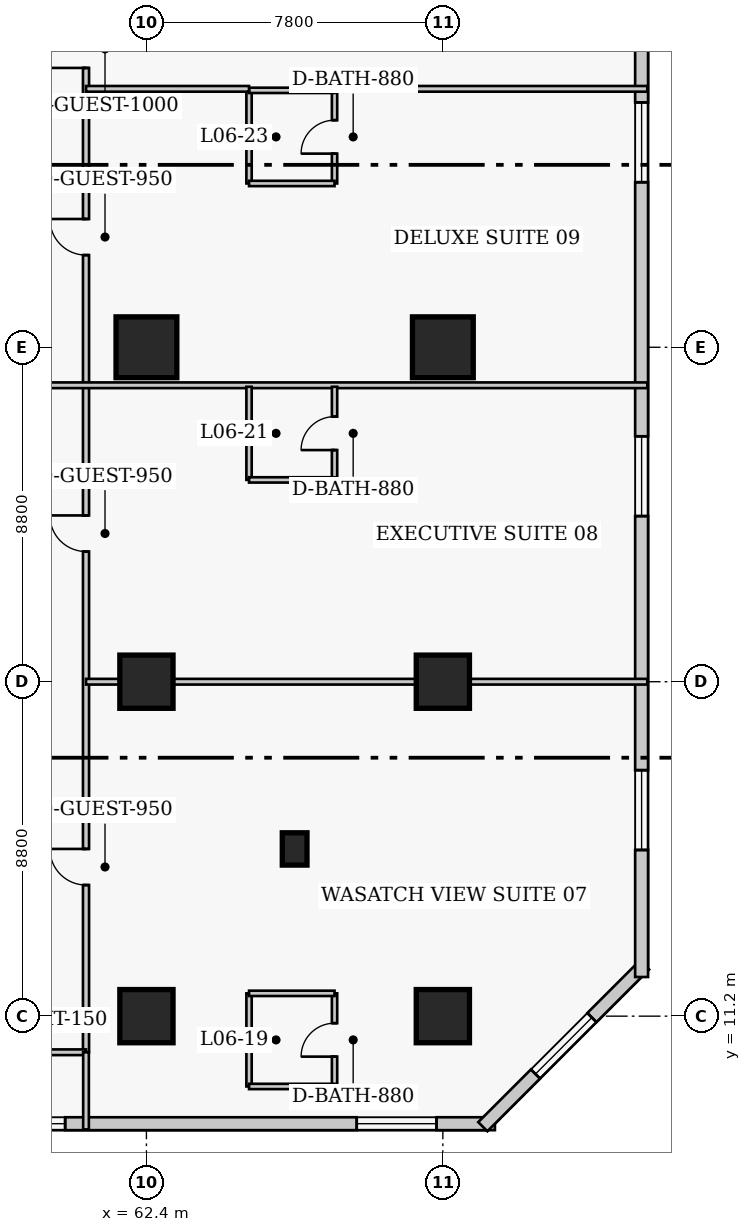
"""IFC4 building model, lengths in metres.
Left out: names, types, materials, properties, quantities, classifications, styles, units other than length and angle.
Written with IfcOpenShell. Run it as: python <this file> out.ifc"""

import sys

from ifc_helpers import new_model, si_unit, direction, frame, frame_2d, origin, origin_2d, place, context, subcontext, project, spatial, rectangle, extrude, element, fill, save


model = new_model("IFC4")
c1 = context("Model", 3, precision=1e-05, world=origin(), true_north=direction((0.0, 1.0)))
c2 = subcontext(c1, "Body", "Model", "MODEL_VIEW")
j1 = project(units=[si_unit("LENGTHUNIT", "METRE"), si_unit("PLANEANGLEUNIT", "RADIAN")], contexts=[c1])
p1 = place(None, origin())
s1 = spatial("IfcSite", under=j1, at=p1, CompositionType="ELEMENT")
p2 = place(p1, origin())
s2 = spatial("IfcBuilding", under=s1, at=p2, CompositionType="ELEMENT")
p3 = place(p2, frame((0.0, 0.0, 29.8)))
s3 = spatial("IfcBuildingStorey", under=s2, at=p3, CompositionType="ELEMENT", Elevation=29.8)
for number, where, z_axis, x_axis in (
    (1, (62.4, 11.2, 0.0), (0.0, 0.0, 1.0), (1.0, 0.0, 0.0)),
    (2, (62.4, 20.0, 0.0), (0.0, 0.0, 1.0), (1.0, 0.0, 0.0)),
):
    element("IfcColumn", number, at=place(p3, frame(where, z_axis=z_axis, x_axis=x_axis)), inside=s3, PredefinedType="COLUMN", context=c2, shape_type="SweptSolid", body=[
        extrude(rectangle(XDim=1.4, YDim=1.4, at=origin_2d()), origin(), (0.0, 0.0, 1.0), 3.8),
    ])
p4 = place(p3, frame((62.4, 28.8, 0.0), z_axis=(0.0, 0.0, 1.0), x_axis=(1.0, 0.0, 0.0)))
e3 = element("IfcColumn", 3, at=p4, inside=s3, PredefinedType="COLUMN", context=c2, shape_type="SweptSolid", body=[
    extrude(rectangle(XDim=1.6, YDim=1.6, at=origin_2d()), origin(), (0.0, 0.0, 1.0), 3.8),
])
for number, where, z_axis, x_axis in (
    (4, (70.2, 11.2, 0.0), (0.0, 0.0, 1.0), (1.0, 0.0, 0.0)),
    (5, (70.2, 20.0, 0.0), (0.0, 0.0, 1.0), (1.0, 0.0, 0.0)),
):
    element("IfcColumn", number, at=place(p3, frame(where, z_axis=z_axis, x_axis=x_axis)), inside=s3, PredefinedType="COLUMN", context=c2, shape_type="SweptSolid", body=[
        extrude(rectangle(XDim=1.4, YDim=1.4, at=origin_2d()), origin(), (0.0, 0.0, 1.0), 3.8),
    ])
p5 = place(p3, frame((70.2, 28.8, 0.0), z_axis=(0.0, 0.0, 1.0), x_axis=(1.0, 0.0, 0.0)))
e6 = element("IfcColumn", 6, at=p5, inside=s3, PredefinedType="COLUMN", context=c2, shape_type="SweptSolid", body=[
    extrude(rectangle(XDim=1.6, YDim=1.6, at=origin_2d()), origin(), (0.0, 0.0, 1.0), 3.8),
])
p6 = place(p3, frame((66.3, 15.6, 0.0), z_axis=(0.0, 0.0, 1.0), x_axis=(1.0, 0.0, 0.0)))
e7 = element("IfcColumn", 7, at=p6, inside=s3, PredefinedType="PILASTER", context=c2, shape_type="SweptSolid", body=[
    extrude(rectangle(XDim=0.65, YDim=0.85, at=origin_2d()), origin(), (0.0, 0.0, 1.0), 3.8),
])
p7 = place(p3, frame((41.68, 8.37, 0.0), z_axis=(0.0, 0.0, 1.0), x_axis=(1.0, 0.0, 0.0)))
e8 = element("IfcWall", 8, at=p7, inside=s3, PredefinedType="SOLIDWALL", context=c2, shape_type="SweptSolid", body=[
    extrude(rectangle(XDim=29.89, YDim=0.34, at=frame_2d((14.945, 0.0))), origin(), (0.0, 0.0, 1.0), 3.54),
])
p8 = place(p7, frame((2.036, 0.0, 0.85)))
e9 = element("IfcOpeningElement", 9, at=p8, cuts=e8, PredefinedType="OPENING", context=c2, shape_type="SweptSolid", body=[
    extrude(rectangle(XDim=2.1, YDim=1.85, at=frame_2d((1.05, 0.925))), frame((0.0, 0.18, 0.0), z_axis=(0.0, -1.0, 0.0), x_axis=(1.0, 0.0, 0.0)), (0.0, 0.0, 1.0), 0.36),
])
p9 = place(p7, frame((9.509, 0.0, 0.85)))
e10 = element("IfcOpeningElement", 10, at=p9, cuts=e8, PredefinedType="OPENING", context=c2, shape_type="SweptSolid", body=[
    extrude(rectangle(XDim=2.1, YDim=1.85, at=frame_2d((1.05, 0.925))), frame((0.0, 0.18, 0.0), z_axis=(0.0, -1.0, 0.0), x_axis=(1.0, 0.0, 0.0)), (0.0, 0.0, 1.0), 0.36),
])
p10 = place(p7, frame((16.481, 0.0, 0.85)))
e11 = element("IfcOpeningElement", 11, at=p10, cuts=e8, PredefinedType="OPENING", context=c2, shape_type="SweptSolid", body=[
    extrude(rectangle(XDim=2.1, YDim=1.85, at=frame_2d((1.05, 0.925))), frame((0.0, 0.18, 0.0), z_axis=(0.0, -1.0, 0.0), x_axis=(1.0, 0.0, 0.0)), (0.0, 0.0, 1.0), 0.36),
])
p11 = place(p7, frame((26.254, 0.0, 0.85)))
e12 = element("IfcOpeningElement", 12, at=p11, cuts=e8, PredefinedType="OPENING", context=c2, shape_type="SweptSolid", body=[
    extrude(rectangle(XDim=2.1, YDim=1.85, at=frame_2d((1.05, 0.925))), frame((0.0, 0.18, 0.0), z_axis=(0.0, -1.0, 0.0), x_axis=(1.0, 0.0, 0.0)), (0.0, 0.0, 1.0), 0.36),
])
p12 = place(p3, frame((71.251, 8.292, 0.0), z_axis=(0.0, 0.0, 1.0), x_axis=(0.707106781187, 0.707106781187, 0.0)))
e13 = element("IfcWall", 13, at=p12, inside=s3, PredefinedType="SOLIDWALL", context=c2, shape_type="SweptSolid", body=[
    extrude(rectangle(XDim=6.02, YDim=0.34, at=frame_2d((3.01, 0.0))), origin(), (0.0, 0.0, 1.0), 3.54),
])
p13 = place(p12, frame((1.96, 0.0, 0.85)))
e14 = element("IfcOpeningElement", 14, at=p13, cuts=e13, PredefinedType="OPENING", context=c2, shape_type="SweptSolid", body=[
    extrude(rectangle(XDim=2.1, YDim=1.85, at=frame_2d((1.05, 0.925))), frame((0.0, 0.18, 0.0), z_axis=(0.0, -1.0, 0.0), x_axis=(1.0, 0.0, 0.0)), (0.0, 0.0, 1.0), 0.36),
])
p14 = place(p3, frame((75.43, 12.23, 0.0), z_axis=(0.0, 0.0, 1.0), x_axis=(0.0, 1.0, 0.0)))
e15 = element("IfcWall", 15, at=p14, inside=s3, PredefinedType="SOLIDWALL", context=c2, shape_type="SweptSolid", body=[
    extrude(rectangle(XDim=35.14, YDim=0.34, at=frame_2d((17.57, 0.0))), origin(), (0.0, 0.0, 1.0), 3.54),
])
p15 = place(p14, frame((3.343, 0.0, 0.85)))
e16 = element("IfcOpeningElement", 16, at=p15, cuts=e15, PredefinedType="OPENING", context=c2, shape_type="SweptSolid", body=[
    extrude(rectangle(XDim=2.1, YDim=1.85, at=frame_2d((1.05, 0.925))), frame((0.0, 0.18, 0.0), z_axis=(0.0, -1.0, 0.0), x_axis=(1.0, 0.0, 0.0)), (0.0, 0.0, 1.0), 0.36),
])
p16 = place(p14, frame((12.127, 0.0, 0.85)))
e17 = element("IfcOpeningElement", 17, at=p16, cuts=e15, PredefinedType="OPENING", context=c2, shape_type="SweptSolid", body=[
    extrude(rectangle(XDim=2.1, YDim=1.85, at=frame_2d((1.05, 0.925))), frame((0.0, 0.18, 0.0), z_axis=(0.0, -1.0, 0.0), x_axis=(1.0, 0.0, 0.0)), (0.0, 0.0, 1.0), 0.36),
])
p17 = place(p14, frame((20.913, 0.0, 0.85)))
e18 = element("IfcOpeningElement", 18, at=p17, cuts=e15, PredefinedType="OPENING", context=c2, shape_type="SweptSolid", body=[
    extrude(rectangle(XDim=2.1, YDim=1.85, at=frame_2d((1.05, 0.925))), frame((0.0, 0.18, 0.0), z_axis=(0.0, -1.0, 0.0), x_axis=(1.0, 0.0, 0.0)), (0.0, 0.0, 1.0), 0.36),
])
p18 = place(p14, frame((29.698, 0.0, 0.85)))
e19 = element("IfcOpeningElement", 19, at=p18, cuts=e15, PredefinedType="OPENING", context=c2, shape_type="SweptSolid", body=[
    extrude(rectangle(XDim=2.1, YDim=1.85, at=frame_2d((1.05, 0.925))), frame((0.0, 0.18, 0.0), z_axis=(0.0, -1.0, 0.0), x_axis=(1.0, 0.0, 0.0)), (0.0, 0.0, 1.0), 0.36),
])
p19 = place(p3, frame((60.81, 10.25, 0.0), z_axis=(0.0, 0.0, 1.0), x_axis=(0.0, 1.0, 0.0)))
e20 = element("IfcWall", 20, at=p19, inside=s3, PredefinedType="PARTITIONING", context=c2, shape_type="SweptSolid", body=[
    extrude(rectangle(XDim=30.4, YDim=0.16, at=frame_2d((15.2, 0.0))), origin(), (0.0, 0.0, 1.0), 3.54),
])
p20 = place(p19, frame((4.4, 0.0, 0.0)))
e21 = element("IfcOpeningElement", 21, at=p20, cuts=e20, PredefinedType="OPENING", context=c2, shape_type="SweptSolid", body=[
    extrude(rectangle(XDim=0.95, YDim=2.1, at=frame_2d((0.475, 1.05))), frame((0.0, 0.09, 0.0), z_axis=(0.0, -1.0, 0.0), x_axis=(1.0, 0.0, 0.0)), (0.0, 0.0, 1.0), 0.18),
])
p21 = place(p19, frame((13.175, 0.0, 0.0)))
e22 = element("IfcOpeningElement", 22, at=p21, cuts=e20, PredefinedType="OPENING", context=c2, shape_type="SweptSolid", body=[
    extrude(rectangle(XDim=0.95, YDim=2.1, at=frame_2d((0.475, 1.05))), frame((0.0, 0.09, 0.0), z_axis=(0.0, -1.0, 0.0), x_axis=(1.0, 0.0, 0.0)), (0.0, 0.0, 1.0), 0.18),
])
p22 = place(p19, frame((20.975, 0.0, 0.0)))
e23 = element("IfcOpeningElement", 23, at=p22, cuts=e20, PredefinedType="OPENING", context=c2, shape_type="SweptSolid", body=[
    extrude(rectangle(XDim=0.95, YDim=2.1, at=frame_2d((0.475, 1.05))), frame((0.0, 0.09, 0.0), z_axis=(0.0, -1.0, 0.0), x_axis=(1.0, 0.0, 0.0)), (0.0, 0.0, 1.0), 0.18),
])
p23 = place(p19, frame((25.9, 0.0, 0.0)))
e24 = element("IfcOpeningElement", 24, at=p23, cuts=e20, PredefinedType="OPENING", context=c2, shape_type="SweptSolid", body=[
    extrude(rectangle(XDim=1.0, YDim=2.15, at=frame_2d((0.5, 1.075))), frame((0.0, 0.09, 0.0), z_axis=(0.0, -1.0, 0.0), x_axis=(1.0, 0.0, 0.0)), (0.0, 0.0, 1.0), 0.18),
])
p24 = place(p3, frame((58.59, 10.25, 0.0), z_axis=(0.0, 0.0, 1.0), x_axis=(1.0, 0.0, 0.0)))
e25 = element("IfcWall", 25, at=p24, inside=s3, PredefinedType="PARTITIONING", context=c2, shape_type="SweptSolid", body=[
    extrude(rectangle(XDim=2.22, YDim=0.15, at=frame_2d((1.11, 0.0))), origin(), (0.0, 0.0, 1.0), 3.54),
])
p25 = place(p3, frame((60.81, 8.22, 0.0), z_axis=(0.0, 0.0, 1.0), x_axis=(0.0, 1.0, 0.0)))
e26 = element("IfcWall", 26, at=p25, inside=s3, PredefinedType="PARTITIONING", context=c2, shape_type="SweptSolid", body=[
    extrude(rectangle(XDim=2.03, YDim=0.15, at=frame_2d((1.015, 0.0))), origin(), (0.0, 0.0, 1.0), 3.54),
])
p26 = place(p3, frame((65.1, 9.35, 0.0), z_axis=(0.0, 0.0, 1.0), x_axis=(0.0, 1.0, 0.0)))
e27 = element("IfcWall", 27, at=p26, inside=s3, PredefinedType="PLUMBINGWALL", context=c2, shape_type="SweptSolid", body=[
    extrude(rectangle(XDim=2.45, YDim=0.14, at=frame_2d((1.225, 0.0))), origin(), (0.0, 0.0, 1.0), 3.54),
])
p27 = place(p3, frame((67.35, 9.35, 0.0), z_axis=(0.0, 0.0, 1.0), x_axis=(0.0, 1.0, 0.0)))
e28 = element("IfcWall", 28, at=p27, inside=s3, PredefinedType="PLUMBINGWALL", context=c2, shape_type="SweptSolid", body=[
    extrude(rectangle(XDim=2.45, YDim=0.14, at=frame_2d((1.225, 0.0))), origin(), (0.0, 0.0, 1.0), 3.54),
])
p28 = place(p27, frame((0.785, 0.0, 0.0)))
e29 = element("IfcOpeningElement", 29, at=p28, cuts=e28, PredefinedType="OPENING", context=c2, shape_type="SweptSolid", body=[
    extrude(rectangle(XDim=0.88, YDim=2.05, at=frame_2d((0.44, 1.025))), frame((0.0, 0.08, 0.0), z_axis=(0.0, -1.0, 0.0), x_axis=(1.0, 0.0, 0.0)), (0.0, 0.0, 1.0), 0.16),
])
for number, where, z_axis, x_axis in (
    (30, (65.1, 9.35, 0.0), (0.0, 0.0, 1.0), (1.0, 0.0, 0.0)),
    (31, (65.1, 11.8, 0.0), (0.0, 0.0, 1.0), (1.0, 0.0, 0.0)),
):
    element("IfcWall", number, at=place(p3, frame(where, z_axis=z_axis, x_axis=x_axis)), inside=s3, PredefinedType="PLUMBINGWALL", context=c2, shape_type="SweptSolid", body=[
        extrude(rectangle(XDim=2.25, YDim=0.14, at=frame_2d((1.125, 0.0))), origin(), (0.0, 0.0, 1.0), 3.54),
    ])
p29 = place(p3, frame((60.81, 20.0, 0.0), z_axis=(0.0, 0.0, 1.0), x_axis=(1.0, 0.0, 0.0)))
e32 = element("IfcWall", 32, at=p29, inside=s3, PredefinedType="PARTITIONING", context=c2, shape_type="SweptSolid", body=[
    extrude(rectangle(XDim=14.77, YDim=0.15, at=frame_2d((7.385, 0.0))), origin(), (0.0, 0.0, 1.0), 2.593),
])
p30 = place(p3, frame((58.86, 27.8, 0.0), z_axis=(0.0, 0.0, 1.0), x_axis=(1.0, 0.0, 0.0)))
e33 = element("IfcWall", 33, at=p30, inside=s3, PredefinedType="PARTITIONING", context=c2, shape_type="SweptSolid", body=[
    extrude(rectangle(XDim=16.72, YDim=0.15, at=frame_2d((8.36, 0.0))), origin(), (0.0, 0.0, 1.0), 3.54),
])
p31 = place(p3, frame((65.1, 25.31, 0.0), z_axis=(0.0, 0.0, 1.0), x_axis=(0.0, 1.0, 0.0)))
e34 = element("IfcWall", 34, at=p31, inside=s3, PredefinedType="PLUMBINGWALL", context=c2, shape_type="SweptSolid", body=[
    extrude(rectangle(XDim=2.45, YDim=0.14, at=frame_2d((1.225, 0.0))), origin(), (0.0, 0.0, 1.0), 3.54),
])
p32 = place(p3, frame((67.35, 25.31, 0.0), z_axis=(0.0, 0.0, 1.0), x_axis=(0.0, 1.0, 0.0)))
e35 = element("IfcWall", 35, at=p32, inside=s3, PredefinedType="PLUMBINGWALL", context=c2, shape_type="SweptSolid", body=[
    extrude(rectangle(XDim=2.45, YDim=0.14, at=frame_2d((1.225, 0.0))), origin(), (0.0, 0.0, 1.0), 3.54),
])
p33 = place(p32, frame((0.785, 0.0, 0.0)))
e36 = element("IfcOpeningElement", 36, at=p33, cuts=e35, PredefinedType="OPENING", context=c2, shape_type="SweptSolid", body=[
    extrude(rectangle(XDim=0.88, YDim=2.05, at=frame_2d((0.44, 1.025))), frame((0.0, 0.08, 0.0), z_axis=(0.0, -1.0, 0.0), x_axis=(1.0, 0.0, 0.0)), (0.0, 0.0, 1.0), 0.16),
])
p34 = place(p3, frame((65.1, 25.31, 0.0), z_axis=(0.0, 0.0, 1.0), x_axis=(1.0, 0.0, 0.0)))
e37 = element("IfcWall", 37, at=p34, inside=s3, PredefinedType="PLUMBINGWALL", context=c2, shape_type="SweptSolid", body=[
    extrude(rectangle(XDim=2.25, YDim=0.14, at=frame_2d((1.125, 0.0))), origin(), (0.0, 0.0, 1.0), 3.54),
])
p35 = place(p3, frame((65.1, 33.11, 0.0), z_axis=(0.0, 0.0, 1.0), x_axis=(0.0, 1.0, 0.0)))
e38 = element("IfcWall", 38, at=p35, inside=s3, PredefinedType="PLUMBINGWALL", context=c2, shape_type="SweptSolid", body=[
    extrude(rectangle(XDim=2.45, YDim=0.14, at=frame_2d((1.225, 0.0))), origin(), (0.0, 0.0, 1.0), 3.54),
])
p36 = place(p3, frame((67.35, 33.11, 0.0), z_axis=(0.0, 0.0, 1.0), x_axis=(0.0, 1.0, 0.0)))
e39 = element("IfcWall", 39, at=p36, inside=s3, PredefinedType="PLUMBINGWALL", context=c2, shape_type="SweptSolid", body=[
    extrude(rectangle(XDim=2.45, YDim=0.14, at=frame_2d((1.225, 0.0))), origin(), (0.0, 0.0, 1.0), 3.54),
])
p37 = place(p36, frame((0.785, 0.0, 0.0)))
e40 = element("IfcOpeningElement", 40, at=p37, cuts=e39, PredefinedType="OPENING", context=c2, shape_type="SweptSolid", body=[
    extrude(rectangle(XDim=0.88, YDim=2.05, at=frame_2d((0.44, 1.025))), frame((0.0, 0.08, 0.0), z_axis=(0.0, -1.0, 0.0), x_axis=(1.0, 0.0, 0.0)), (0.0, 0.0, 1.0), 0.16),
])
for number, where, z_axis, x_axis in (
    (41, (65.1, 33.11, 0.0), (0.0, 0.0, 1.0), (1.0, 0.0, 0.0)),
    (42, (65.1, 35.56, 0.0), (0.0, 0.0, 1.0), (1.0, 0.0, 0.0)),
):
    element("IfcWall", number, at=place(p3, frame(where, z_axis=z_axis, x_axis=x_axis)), inside=s3, PredefinedType="PLUMBINGWALL", context=c2, shape_type="SweptSolid", body=[
        extrude(rectangle(XDim=2.25, YDim=0.14, at=frame_2d((1.125, 0.0))), origin(), (0.0, 0.0, 1.0), 3.54),
    ])
p38 = place(p3, frame((60.81, 35.6, 0.0), z_axis=(0.0, 0.0, 1.0), x_axis=(1.0, 0.0, 0.0)))
e43 = element("IfcWall", 43, at=p38, inside=s3, PredefinedType="PARTITIONING", context=c2, shape_type="SweptSolid", body=[
    extrude(rectangle(XDim=4.29, YDim=0.15, at=frame_2d((2.145, 0.0))), origin(), (0.0, 0.0, 1.0), 3.54),
])
p39 = place(p3, frame((67.35, 35.6, 0.0), z_axis=(0.0, 0.0, 1.0), x_axis=(1.0, 0.0, 0.0)))
e44 = element("IfcWall", 44, at=p39, inside=s3, PredefinedType="PARTITIONING", context=c2, shape_type="SweptSolid", body=[
    extrude(rectangle(XDim=8.23, YDim=0.15, at=frame_2d((4.115, 0.0))), origin(), (0.0, 0.0, 1.0), 3.54),
])
p40 = place(p10, origin())
e45 = element("IfcWindow", 45, at=p40, inside=s3, PartitioningType="SINGLE_PANEL", PredefinedType="WINDOW", context=c2, shape_type="SweptSolid", body=[
    extrude(rectangle(XDim=2.1, YDim=1.85, at=frame_2d((1.05, 0.925))), frame((0.0, 0.03, 0.0), z_axis=(0.0, -1.0, 0.0), x_axis=(1.0, 0.0, 0.0)), (0.0, 0.0, 1.0), 0.06),
])
fill(e11, e45)
p41 = place(p11, origin())
e46 = element("IfcWindow", 46, at=p41, inside=s3, PartitioningType="SINGLE_PANEL", PredefinedType="WINDOW", context=c2, shape_type="SweptSolid", body=[
    extrude(rectangle(XDim=2.1, YDim=1.85, at=frame_2d((1.05, 0.925))), frame((0.0, 0.03, 0.0), z_axis=(0.0, -1.0, 0.0), x_axis=(1.0, 0.0, 0.0)), (0.0, 0.0, 1.0), 0.06),
])
fill(e12, e46)
p42 = place(p13, origin())
e47 = element("IfcWindow", 47, at=p42, inside=s3, PartitioningType="SINGLE_PANEL", PredefinedType="WINDOW", context=c2, shape_type="SweptSolid", body=[
    extrude(rectangle(XDim=2.1, YDim=1.85, at=frame_2d((1.05, 0.925))), frame((0.0, 0.03, 0.0), z_axis=(0.0, -1.0, 0.0), x_axis=(1.0, 0.0, 0.0)), (0.0, 0.0, 1.0), 0.06),
])
fill(e14, e47)
p43 = place(p15, origin())
e48 = element("IfcWindow", 48, at=p43, inside=s3, PartitioningType="SINGLE_PANEL", PredefinedType="WINDOW", context=c2, shape_type="SweptSolid", body=[
    extrude(rectangle(XDim=2.1, YDim=1.85, at=frame_2d((1.05, 0.925))), frame((0.0, 0.03, 0.0), z_axis=(0.0, -1.0, 0.0), x_axis=(1.0, 0.0, 0.0)), (0.0, 0.0, 1.0), 0.06),
])
fill(e16, e48)
p44 = place(p16, origin())
e49 = element("IfcWindow", 49, at=p44, inside=s3, PartitioningType="SINGLE_PANEL", PredefinedType="WINDOW", context=c2, shape_type="SweptSolid", body=[
    extrude(rectangle(XDim=2.1, YDim=1.85, at=frame_2d((1.05, 0.925))), frame((0.0, 0.03, 0.0), z_axis=(0.0, -1.0, 0.0), x_axis=(1.0, 0.0, 0.0)), (0.0, 0.0, 1.0), 0.06),
])
fill(e17, e49)
p45 = place(p17, origin())
e50 = element("IfcWindow", 50, at=p45, inside=s3, PartitioningType="SINGLE_PANEL", PredefinedType="WINDOW", context=c2, shape_type="SweptSolid", body=[
    extrude(rectangle(XDim=2.1, YDim=1.85, at=frame_2d((1.05, 0.925))), frame((0.0, 0.03, 0.0), z_axis=(0.0, -1.0, 0.0), x_axis=(1.0, 0.0, 0.0)), (0.0, 0.0, 1.0), 0.06),
])
fill(e18, e50)
p46 = place(p28, origin())
e51 = element("IfcDoor", 51, at=p46, inside=s3, OperationType="SINGLE_SWING_LEFT", PredefinedType="DOOR", context=c2, shape_type="SweptSolid", body=[
    extrude(rectangle(XDim=0.88, YDim=2.05, at=frame_2d((0.44, 1.025))), frame((0.0, 0.025, 0.0), z_axis=(0.0, -1.0, 0.0), x_axis=(1.0, 0.0, 0.0)), (0.0, 0.0, 1.0), 0.05),
])
fill(e29, e51)
p47 = place(p20, origin())
e52 = element("IfcDoor", 52, at=p47, inside=s3, OperationType="SINGLE_SWING_RIGHT", PredefinedType="DOOR", context=c2, shape_type="SweptSolid", body=[
    extrude(rectangle(XDim=0.95, YDim=2.1, at=frame_2d((0.475, 1.05))), frame((0.0, 0.025, 0.0), z_axis=(0.0, -1.0, 0.0), x_axis=(1.0, 0.0, 0.0)), (0.0, 0.0, 1.0), 0.05),
])
fill(e21, e52)
p48 = place(p33, origin())
e53 = element("IfcDoor", 53, at=p48, inside=s3, OperationType="SINGLE_SWING_LEFT", PredefinedType="DOOR", context=c2, shape_type="SweptSolid", body=[
    extrude(rectangle(XDim=0.88, YDim=2.05, at=frame_2d((0.44, 1.025))), frame((0.0, 0.025, 0.0), z_axis=(0.0, -1.0, 0.0), x_axis=(1.0, 0.0, 0.0)), (0.0, 0.0, 1.0), 0.05),
])
fill(e36, e53)
p49 = place(p21, origin())
e54 = element("IfcDoor", 54, at=p49, inside=s3, OperationType="SINGLE_SWING_RIGHT", PredefinedType="DOOR", context=c2, shape_type="SweptSolid", body=[
    extrude(rectangle(XDim=0.95, YDim=2.1, at=frame_2d((0.475, 1.05))), frame((0.0, 0.025, 0.0), z_axis=(0.0, -1.0, 0.0), x_axis=(1.0, 0.0, 0.0)), (0.0, 0.0, 1.0), 0.05),
])
fill(e22, e54)
p50 = place(p37, origin())
e55 = element("IfcDoor", 55, at=p50, inside=s3, OperationType="SINGLE_SWING_LEFT", PredefinedType="DOOR", context=c2, shape_type="SweptSolid", body=[
    extrude(rectangle(XDim=0.88, YDim=2.05, at=frame_2d((0.44, 1.025))), frame((0.0, 0.025, 0.0), z_axis=(0.0, -1.0, 0.0), x_axis=(1.0, 0.0, 0.0)), (0.0, 0.0, 1.0), 0.05),
])
fill(e40, e55)
p51 = place(p22, origin())
e56 = element("IfcDoor", 56, at=p51, inside=s3, OperationType="SINGLE_SWING_RIGHT", PredefinedType="DOOR", context=c2, shape_type="SweptSolid", body=[
    extrude(rectangle(XDim=0.95, YDim=2.1, at=frame_2d((0.475, 1.05))), frame((0.0, 0.025, 0.0), z_axis=(0.0, -1.0, 0.0), x_axis=(1.0, 0.0, 0.0)), (0.0, 0.0, 1.0), 0.05),
])
fill(e23, e56)
p52 = place(p23, origin())
e57 = element("IfcDoor", 57, at=p52, inside=s3, OperationType="SINGLE_SWING_LEFT", PredefinedType="DOOR", context=c2, shape_type="SweptSolid", body=[
    extrude(rectangle(XDim=1.0, YDim=2.15, at=frame_2d((0.5, 1.075))), frame((0.0, 0.025, 0.0), z_axis=(0.0, -1.0, 0.0), x_axis=(1.0, 0.0, 0.0)), (0.0, 0.0, 1.0), 0.05),
])
fill(e24, e57)
save(model, sys.argv[1])
